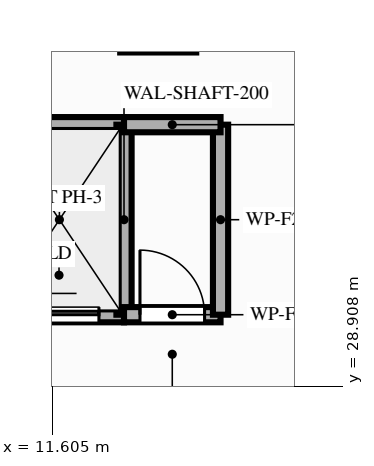
"""IFC4 building model, lengths in metres.
Left out: names, types, materials, properties, quantities, classifications, styles, units other than length and angle.
Written with IfcOpenShell. Run it as: python <this file> out.ifc"""

import sys

from ifc_helpers import new_model, si_unit, direction, frame, frame_2d, origin, place, context, subcontext, project, spatial, rectangle, extrude, element, fill, save


model = new_model("IFC4")
c1 = context("Model", 3, precision=1e-05, world=origin(), true_north=direction((0.0, 1.0)))
c2 = subcontext(c1, "Body", "Model", "MODEL_VIEW")
j1 = project(units=[si_unit("LENGTHUNIT", "METRE"), si_unit("PLANEANGLEUNIT", "RADIAN")], contexts=[c1])
p1 = place(None, origin())
s1 = spatial("IfcSite", under=j1, at=p1, CompositionType="ELEMENT")
p2 = place(p1, origin())
s2 = spatial("IfcBuilding", under=s1, at=p2, CompositionType="ELEMENT")
p3 = place(p2, frame((0.0, 0.0, 188.8)))
s3 = spatial("IfcBuildingStorey", under=s2, at=p3, CompositionType="ELEMENT", Elevation=188.8)
p4 = place(p3, frame((7.0, 29.85, 0.0), z_axis=(0.0, 0.0, 1.0), x_axis=(1.0, 0.0, 0.0)))
e1 = element("IfcWall", 1, at=p4, inside=s3, PredefinedType="MOVABLE", context=c2, shape_type="SweptSolid", body=[
    extrude(rectangle(XDim=5.55, YDim=0.2, at=frame_2d((2.775, 0.0))), origin(), (0.0, 0.0, 1.0), 3.02),
])
p5 = place(p4, frame((0.38, 0.0, 0.0)))
e2 = element("IfcOpeningElement", 2, at=p5, cuts=e1, PredefinedType="OPENING", context=c2, shape_type="SweptSolid", body=[
    extrude(rectangle(XDim=1.05, YDim=2.15, at=frame_2d((0.525, 1.075))), frame((0.0, 0.11, 0.0), z_axis=(0.0, -1.0, 0.0), x_axis=(1.0, 0.0, 0.0)), (0.0, 0.0, 1.0), 0.22),
])
p6 = place(p4, frame((2.28, 0.0, 0.0)))
e3 = element("IfcOpeningElement", 3, at=p6, cuts=e1, PredefinedType="OPENING", context=c2, shape_type="SweptSolid", body=[
    extrude(rectangle(XDim=1.05, YDim=2.15, at=frame_2d((0.525, 1.075))), frame((0.0, 0.11, 0.0), z_axis=(0.0, -1.0, 0.0), x_axis=(1.0, 0.0, 0.0)), (0.0, 0.0, 1.0), 0.22),
])
p7 = place(p4, frame((4.17, 0.0, 0.0)))
e4 = element("IfcOpeningElement", 4, at=p7, cuts=e1, PredefinedType="OPENING", context=c2, shape_type="SweptSolid", body=[
    extrude(rectangle(XDim=1.05, YDim=2.15, at=frame_2d((0.525, 1.075))), frame((0.0, 0.11, 0.0), z_axis=(0.0, -1.0, 0.0), x_axis=(1.0, 0.0, 0.0)), (0.0, 0.0, 1.0), 0.22),
])
p8 = place(p3, frame((7.0, 32.35, 0.0), z_axis=(0.0, 0.0, 1.0), x_axis=(1.0, 0.0, 0.0)))
e5 = element("IfcWall", 5, at=p8, inside=s3, PredefinedType="MOVABLE", context=c2, shape_type="SweptSolid", body=[
    extrude(rectangle(XDim=5.55, YDim=0.2, at=frame_2d((2.775, 0.0))), origin(), (0.0, 0.0, 1.0), 3.02),
])
p9 = place(p3, frame((12.55, 29.85, 0.0), z_axis=(0.0, 0.0, 1.0), x_axis=(0.0, 1.0, 0.0)))
e6 = element("IfcWall", 6, at=p9, inside=s3, PredefinedType="MOVABLE", context=c2, shape_type="SweptSolid", body=[
    extrude(rectangle(XDim=2.5, YDim=0.2, at=frame_2d((1.25, 0.0))), origin(), (0.0, 0.0, 1.0), 3.02),
])
p10 = place(p3, frame((12.55, 29.85, 0.0), z_axis=(0.0, 0.0, 1.0), x_axis=(1.0, 0.0, 0.0)))
e7 = element("IfcWall", 7, at=p10, inside=s3, PredefinedType="PARTITIONING", context=c2, shape_type="SweptSolid", body=[
    extrude(rectangle(XDim=1.27, YDim=0.2, at=frame_2d((0.635, 0.0))), origin(), (0.0, 0.0, 1.0), 3.02),
])
p11 = place(p10, frame((0.21, 0.0, 0.0)))
e8 = element("IfcOpeningElement", 8, at=p11, cuts=e7, PredefinedType="OPENING", context=c2, shape_type="SweptSolid", body=[
    extrude(rectangle(XDim=0.85, YDim=2.05, at=frame_2d((0.425, 1.025))), frame((0.0, 0.11, 0.0), z_axis=(0.0, -1.0, 0.0), x_axis=(1.0, 0.0, 0.0)), (0.0, 0.0, 1.0), 0.22),
])
p12 = place(p3, frame((13.82, 29.85, 0.0), z_axis=(0.0, 0.0, 1.0), x_axis=(0.0, 1.0, 0.0)))
e9 = element("IfcWall", 9, at=p12, inside=s3, PredefinedType="PARTITIONING", context=c2, shape_type="SweptSolid", body=[
    extrude(rectangle(XDim=2.5, YDim=0.2, at=frame_2d((1.25, 0.0))), origin(), (0.0, 0.0, 1.0), 3.02),
])
p13 = place(p3, frame((12.55, 32.35, 0.0), z_axis=(0.0, 0.0, 1.0), x_axis=(1.0, 0.0, 0.0)))
e10 = element("IfcWall", 10, at=p13, inside=s3, PredefinedType="PARTITIONING", context=c2, shape_type="SweptSolid", body=[
    extrude(rectangle(XDim=1.27, YDim=0.2, at=frame_2d((0.635, 0.0))), origin(), (0.0, 0.0, 1.0), 3.02),
])
p14 = place(p7, origin())
e11 = element("IfcDoor", 11, at=p14, inside=s3, OperationType="SLIDING_TO_LEFT", PredefinedType="DOOR", context=c2, shape_type="SweptSolid", body=[
    extrude(rectangle(XDim=1.05, YDim=2.15, at=frame_2d((0.525, 1.075))), frame((0.0, 0.025, 0.0), z_axis=(0.0, -1.0, 0.0), x_axis=(1.0, 0.0, 0.0)), (0.0, 0.0, 1.0), 0.05),
])
fill(e4, e11)
p15 = place(p11, origin())
e12 = element("IfcDoor", 12, at=p15, inside=s3, OperationType="SINGLE_SWING_LEFT", PredefinedType="DOOR", context=c2, shape_type="SweptSolid", body=[
    extrude(rectangle(XDim=0.85, YDim=2.05, at=frame_2d((0.425, 1.025))), frame((0.0, 0.025, 0.0), z_axis=(0.0, -1.0, 0.0), x_axis=(1.0, 0.0, 0.0)), (0.0, 0.0, 1.0), 0.05),
])
fill(e8, e12)
save(model, sys.argv[1])
